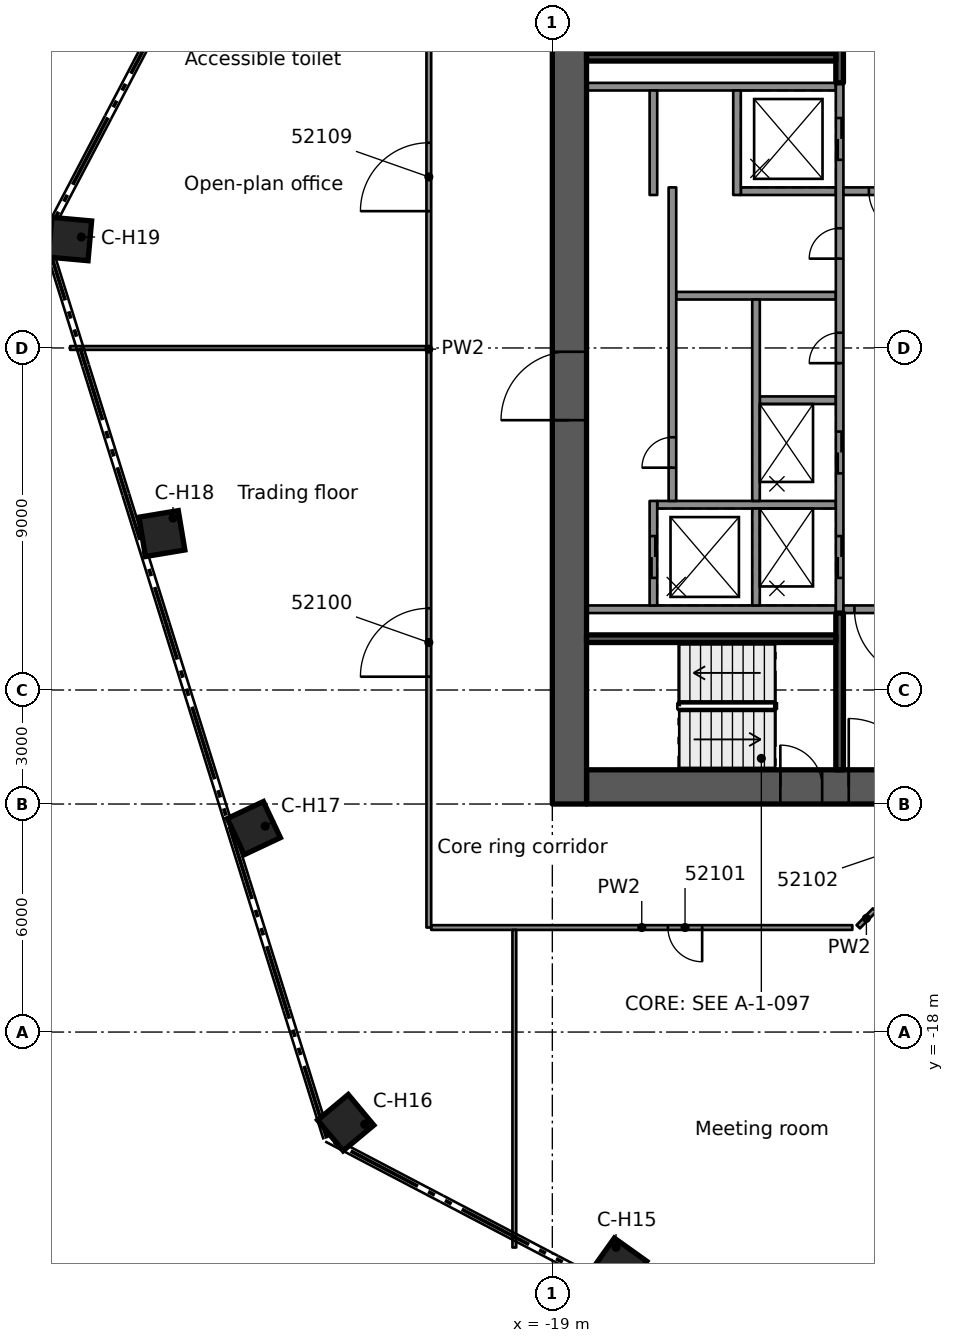
"""IFC4 building model, lengths in metres.
Left out: names, types, materials, properties, quantities, classifications, styles, units other than length and angle.
Written with IfcOpenShell. Run it as: python <this file> out.ifc"""

import sys

from ifc_helpers import new_model, si_unit, direction, frame, frame_2d, origin, origin_2d, place, context, subcontext, project, spatial, rectangle, extrude, element, fill, save


model = new_model("IFC4")
c1 = context("Model", 3, precision=1e-05, world=origin(), true_north=direction((0.0, 1.0)))
c2 = subcontext(c1, "Body", "Model", "MODEL_VIEW")
j1 = project(units=[si_unit("LENGTHUNIT", "METRE"), si_unit("PLANEANGLEUNIT", "RADIAN")], contexts=[c1])
p1 = place(None, origin())
s1 = spatial("IfcSite", under=j1, at=p1, CompositionType="ELEMENT")
p2 = place(p1, origin())
s2 = spatial("IfcBuilding", under=s1, at=p2, CompositionType="ELEMENT")
p3 = place(p2, frame((0.0, 0.0, 257.0)))
s3 = spatial("IfcBuildingStorey", under=s2, at=p3, CompositionType="ELEMENT", Elevation=257.0)
p4 = place(p3, frame((-18.1, -11.55, 0.0), z_axis=(0.0, 0.0, 1.0), x_axis=(1.0, 0.0, 0.0)))
e1 = element("IfcWall", 1, at=p4, inside=s3, PredefinedType="SHEAR", context=c2, shape_type="SweptSolid", body=[
    extrude(rectangle(XDim=9.2, YDim=0.9, at=frame_2d((4.6, 0.0))), origin(), (0.0, 0.0, 1.0), 3.5),
])
p5 = place(p4, frame((6.9, 0.0, 0.0)))
e2 = element("IfcOpeningElement", 2, at=p5, cuts=e1, PredefinedType="OPENING", context=c2, shape_type="SweptSolid", body=[
    extrude(rectangle(XDim=1.8, YDim=2.1, at=frame_2d((0.9, 1.05))), frame((0.0, 0.46, 0.0), z_axis=(0.0, -1.0, 0.0), x_axis=(1.0, 0.0, 0.0)), (0.0, 0.0, 1.0), 0.92),
])
p6 = place(p4, frame((5.1, 0.0, 0.0)))
e3 = element("IfcOpeningElement", 3, at=p6, cuts=e1, PredefinedType="OPENING", context=c2, shape_type="SweptSolid", body=[
    extrude(rectangle(XDim=1.1, YDim=2.1, at=frame_2d((0.55, 1.05))), frame((0.0, 0.46, 0.0), z_axis=(0.0, -1.0, 0.0), x_axis=(1.0, 0.0, 0.0)), (0.0, 0.0, 1.0), 0.92),
])
p7 = place(p3, frame((-18.55, -12.0, 0.0), z_axis=(0.0, 0.0, 1.0), x_axis=(0.0, 1.0, 0.0)))
e4 = element("IfcWall", 4, at=p7, inside=s3, PredefinedType="SHEAR", context=c2, shape_type="SweptSolid", body=[
    extrude(rectangle(XDim=24.0, YDim=0.9, at=frame_2d((12.0, 0.0))), origin(), (0.0, 0.0, 1.0), 3.5),
])
p8 = place(p7, frame((10.1, 0.0, 0.0)))
e5 = element("IfcOpeningElement", 5, at=p8, cuts=e4, PredefinedType="OPENING", context=c2, shape_type="SweptSolid", body=[
    extrude(rectangle(XDim=1.8, YDim=2.1, at=frame_2d((0.9, 1.05))), frame((0.0, 0.46, 0.0), z_axis=(0.0, -1.0, 0.0), x_axis=(1.0, 0.0, 0.0)), (0.0, 0.0, 1.0), 0.92),
])
for number, where, z_axis, x_axis in (
    (6, (-17.246, -24.154, 0.0), (0.0, 0.0, 1.0), (-0.581, -0.814, 0.0)),
    (7, (-24.437, -20.384, 0.0), (0.0, 0.0, 1.0), (-0.768, -0.641, 0.0)),
    (8, (-26.855, -12.634, 0.0), (0.0, 0.0, 1.0), (-0.905, -0.426, 0.0)),
    (9, (-29.274, -4.884, 0.0), (0.0, 0.0, 1.0), (-0.986, -0.165, 0.0)),
    (10, (-31.693, 2.866, 0.0), (0.0, 0.0, 1.0), (-0.996, 0.09, 0.0)),
):
    element("IfcColumn", number, at=place(p3, frame(where, z_axis=z_axis, x_axis=x_axis)), inside=s3, PredefinedType="COLUMN", context=c2, shape_type="SweptSolid", body=[
        extrude(rectangle(XDim=1.05, YDim=1.05, at=origin_2d()), origin(), (0.0, 0.0, 1.0), 3.5),
    ])
for number, where, z_axis, x_axis in (
    (11, (-11.54, 6.875, 0.0), (0.0, 0.0, 1.0), (-1.0, 0.0, 0.0)),
    (12, (-11.54, -6.875, 0.0), (0.0, 0.0, 1.0), (-1.0, 0.0, 0.0)),
):
    element("IfcWall", number, at=place(p3, frame(where, z_axis=z_axis, x_axis=x_axis)), inside=s3, PredefinedType="SOLIDWALL", context=c2, shape_type="SweptSolid", body=[
        extrude(rectangle(XDim=6.56, YDim=0.2, at=frame_2d((3.28, 0.0))), origin(), (0.0, 0.0, 1.0), 3.09),
    ])
p9 = place(p3, frame((-11.54, -4.125, 0.0), z_axis=(0.0, 0.0, 1.0), x_axis=(-1.0, 0.0, 0.0)))
e13 = element("IfcWall", 13, at=p9, inside=s3, PredefinedType="SOLIDWALL", context=c2, shape_type="SweptSolid", body=[
    extrude(rectangle(XDim=4.7, YDim=0.2, at=frame_2d((2.35, 0.0))), origin(), (0.0, 0.0, 1.0), 3.09),
])
p10 = place(p3, frame((-11.54, -1.375, 0.0), z_axis=(0.0, 0.0, 1.0), x_axis=(-1.0, 0.0, 0.0)))
e14 = element("IfcWall", 14, at=p10, inside=s3, PredefinedType="SOLIDWALL", context=c2, shape_type="SweptSolid", body=[
    extrude(rectangle(XDim=2.0, YDim=0.2, at=frame_2d((1.0, 0.0))), origin(), (0.0, 0.0, 1.0), 3.09),
])
p11 = place(p3, frame((-11.54, 1.375, 0.0), z_axis=(0.0, 0.0, 1.0), x_axis=(-1.0, 0.0, 0.0)))
e15 = element("IfcWall", 15, at=p11, inside=s3, PredefinedType="SOLIDWALL", context=c2, shape_type="SweptSolid", body=[
    extrude(rectangle(XDim=4.2, YDim=0.2, at=frame_2d((2.1, 0.0))), origin(), (0.0, 0.0, 1.0), 3.09),
])
p12 = place(p3, frame((-11.54, 4.125, 0.0), z_axis=(0.0, 0.0, 1.0), x_axis=(-1.0, 0.0, 0.0)))
e16 = element("IfcWall", 16, at=p12, inside=s3, PredefinedType="SOLIDWALL", context=c2, shape_type="SweptSolid", body=[
    extrude(rectangle(XDim=2.5, YDim=0.2, at=frame_2d((1.25, 0.0))), origin(), (0.0, 0.0, 1.0), 3.09),
])
p13 = place(p3, frame((-11.44, -6.975, 0.0), z_axis=(0.0, 0.0, 1.0), x_axis=(0.0, 1.0, 0.0)))
e17 = element("IfcWall", 17, at=p13, inside=s3, PredefinedType="SOLIDWALL", context=c2, shape_type="SweptSolid", body=[
    extrude(rectangle(XDim=13.95, YDim=0.2, at=frame_2d((6.975, 0.0))), origin(), (0.0, 0.0, 1.0), 3.09),
])
p14 = place(p13, frame((0.925, 0.0, 0.0)))
e18 = element("IfcOpeningElement", 18, at=p14, cuts=e17, PredefinedType="OPENING", context=c2, shape_type="SweptSolid", body=[
    extrude(rectangle(XDim=1.1, YDim=2.1, at=frame_2d((0.55, 1.05))), frame((0.0, 0.11, 0.0), z_axis=(0.0, -1.0, 0.0), x_axis=(1.0, 0.0, 0.0)), (0.0, 0.0, 1.0), 0.22),
])
p15 = place(p13, frame((3.675, 0.0, 0.0)))
e19 = element("IfcOpeningElement", 19, at=p15, cuts=e17, PredefinedType="OPENING", context=c2, shape_type="SweptSolid", body=[
    extrude(rectangle(XDim=1.1, YDim=2.1, at=frame_2d((0.55, 1.05))), frame((0.0, 0.11, 0.0), z_axis=(0.0, -1.0, 0.0), x_axis=(1.0, 0.0, 0.0)), (0.0, 0.0, 1.0), 0.22),
])
p16 = place(p13, frame((11.925, 0.0, 0.0)))
e20 = element("IfcOpeningElement", 20, at=p16, cuts=e17, PredefinedType="OPENING", context=c2, shape_type="SweptSolid", body=[
    extrude(rectangle(XDim=1.1, YDim=2.1, at=frame_2d((0.55, 1.05))), frame((0.0, 0.11, 0.0), z_axis=(0.0, -1.0, 0.0), x_axis=(1.0, 0.0, 0.0)), (0.0, 0.0, 1.0), 0.22),
])
p17 = place(p13, frame((6.575, 0.0, 0.0)))
e21 = element("IfcOpeningElement", 21, at=p17, cuts=e17, PredefinedType="OPENING", context=c2, shape_type="SweptSolid", body=[
    extrude(rectangle(XDim=0.8, YDim=2.1, at=frame_2d((0.4, 1.05))), frame((0.0, 0.11, 0.0), z_axis=(0.0, -1.0, 0.0), x_axis=(1.0, 0.0, 0.0)), (0.0, 0.0, 1.0), 0.22),
])
p18 = place(p13, frame((9.325, 0.0, 0.0)))
e22 = element("IfcOpeningElement", 22, at=p18, cuts=e17, PredefinedType="OPENING", context=c2, shape_type="SweptSolid", body=[
    extrude(rectangle(XDim=0.8, YDim=2.1, at=frame_2d((0.4, 1.05))), frame((0.0, 0.11, 0.0), z_axis=(0.0, -1.0, 0.0), x_axis=(1.0, 0.0, 0.0)), (0.0, 0.0, 1.0), 0.22),
])
p19 = place(p3, frame((-13.64, -6.775, 0.0), z_axis=(0.0, 0.0, 1.0), x_axis=(0.0, 1.0, 0.0)))
e23 = element("IfcWall", 23, at=p19, inside=s3, PredefinedType="SOLIDWALL", context=c2, shape_type="SweptSolid", body=[
    extrude(rectangle(XDim=2.55, YDim=0.2, at=frame_2d((1.275, 0.0))), origin(), (0.0, 0.0, 1.0), 3.09),
])
p20 = place(p3, frame((-13.64, -4.025, 0.0), z_axis=(0.0, 0.0, 1.0), x_axis=(0.0, 1.0, 0.0)))
e24 = element("IfcWall", 24, at=p20, inside=s3, PredefinedType="SOLIDWALL", context=c2, shape_type="SweptSolid", body=[
    extrude(rectangle(XDim=5.3, YDim=0.2, at=frame_2d((2.65, 0.0))), origin(), (0.0, 0.0, 1.0), 3.09),
])
p21 = place(p3, frame((-14.14, 4.025, 0.0), z_axis=(0.0, 0.0, 1.0), x_axis=(0.0, 1.0, 0.0)))
e25 = element("IfcWall", 25, at=p21, inside=s3, PredefinedType="SOLIDWALL", context=c2, shape_type="SweptSolid", body=[
    extrude(rectangle(XDim=2.75, YDim=0.2, at=frame_2d((1.375, 0.0))), origin(), (0.0, 0.0, 1.0), 3.09),
])
p22 = place(p3, frame((-16.34, -6.775, 0.0), z_axis=(0.0, 0.0, 1.0), x_axis=(0.0, 1.0, 0.0)))
e26 = element("IfcWall", 26, at=p22, inside=s3, PredefinedType="SOLIDWALL", context=c2, shape_type="SweptSolid", body=[
    extrude(rectangle(XDim=2.75, YDim=0.2, at=frame_2d((1.375, 0.0))), origin(), (0.0, 0.0, 1.0), 3.09),
])
p23 = place(p22, frame((0.725, 0.0, 0.0)))
e27 = element("IfcOpeningElement", 27, at=p23, cuts=e26, PredefinedType="OPENING", context=c2, shape_type="SweptSolid", body=[
    extrude(rectangle(XDim=1.1, YDim=2.1, at=frame_2d((0.55, 1.05))), frame((0.0, 0.11, 0.0), z_axis=(0.0, -1.0, 0.0), x_axis=(1.0, 0.0, 0.0)), (0.0, 0.0, 1.0), 0.22),
])
p24 = place(p3, frame((-15.84, -4.025, 0.0), z_axis=(0.0, 0.0, 1.0), x_axis=(0.0, 1.0, 0.0)))
e28 = element("IfcWall", 28, at=p24, inside=s3, PredefinedType="SOLIDWALL", context=c2, shape_type="SweptSolid", body=[
    extrude(rectangle(XDim=8.25, YDim=0.2, at=frame_2d((4.125, 0.0))), origin(), (0.0, 0.0, 1.0), 3.09),
])
p25 = place(p24, frame((0.875, 0.0, 0.0)))
e29 = element("IfcOpeningElement", 29, at=p25, cuts=e28, PredefinedType="OPENING", context=c2, shape_type="SweptSolid", body=[
    extrude(rectangle(XDim=0.8, YDim=2.1, at=frame_2d((0.4, 1.05))), frame((0.0, 0.11, 0.0), z_axis=(0.0, -1.0, 0.0), x_axis=(1.0, 0.0, 0.0)), (0.0, 0.0, 1.0), 0.22),
])
p26 = place(p3, frame((-16.34, 4.025, 0.0), z_axis=(0.0, 0.0, 1.0), x_axis=(0.0, 1.0, 0.0)))
e30 = element("IfcWall", 30, at=p26, inside=s3, PredefinedType="SOLIDWALL", context=c2, shape_type="SweptSolid", body=[
    extrude(rectangle(XDim=2.75, YDim=0.2, at=frame_2d((1.375, 0.0))), origin(), (0.0, 0.0, 1.0), 3.09),
])
p27 = place(p3, frame((-11.44, 6.975, 0.0), z_axis=(0.0, 0.0, 1.0), x_axis=(0.0, 1.0, 0.0)))
e31 = element("IfcWall", 31, at=p27, inside=s3, PredefinedType="SOLIDWALL", context=c2, shape_type="SweptSolid", body=[
    extrude(rectangle(XDim=4.125, YDim=0.2, at=frame_2d((2.062, 0.0))), origin(), (0.0, 0.0, 1.0), 3.09),
])
p28 = place(p27, frame((2.1, 0.0, 0.0)))
e32 = element("IfcOpeningElement", 32, at=p28, cuts=e31, PredefinedType="OPENING", context=c2, shape_type="SweptSolid", body=[
    extrude(rectangle(XDim=1.1, YDim=2.1, at=frame_2d((0.55, 1.05))), frame((0.0, 0.11, 0.0), z_axis=(0.0, -1.0, 0.0), x_axis=(1.0, 0.0, 0.0)), (0.0, 0.0, 1.0), 0.22),
])
p29 = place(p3, frame((-11.54, 7.65, 0.0), z_axis=(0.0, 0.0, 1.0), x_axis=(-1.0, 0.0, 0.0)))
e33 = element("IfcWall", 33, at=p29, inside=s3, PredefinedType="SOLIDWALL", context=c2, shape_type="SweptSolid", body=[
    extrude(rectangle(XDim=6.56, YDim=0.2, at=frame_2d((3.28, 0.0))), origin(), (0.0, 0.0, 1.0), 3.09),
])
p30 = place(p3, frame((-11.44, -11.1, 0.0), z_axis=(0.0, 0.0, 1.0), x_axis=(0.0, 1.0, 0.0)))
e34 = element("IfcWall", 34, at=p30, inside=s3, PredefinedType="SOLIDWALL", context=c2, shape_type="SweptSolid", body=[
    extrude(rectangle(XDim=4.125, YDim=0.2, at=frame_2d((2.062, 0.0))), origin(), (0.0, 0.0, 1.0), 3.09),
])
p31 = place(p3, frame((-11.54, -7.65, 0.0), z_axis=(0.0, 0.0, 1.0), x_axis=(-1.0, 0.0, 0.0)))
e35 = element("IfcWall", 35, at=p31, inside=s3, PredefinedType="SOLIDWALL", context=c2, shape_type="SweptSolid", body=[
    extrude(rectangle(XDim=6.56, YDim=0.2, at=frame_2d((3.28, 0.0))), origin(), (0.0, 0.0, 1.0), 3.09),
])
p32 = place(p3, frame((-8.9, 4.125, 0.0), z_axis=(0.0, 0.0, 1.0), x_axis=(-1.0, 0.0, 0.0)))
e36 = element("IfcWall", 36, at=p32, inside=s3, PredefinedType="PARTITIONING", context=c2, shape_type="SweptSolid", body=[
    extrude(rectangle(XDim=2.44, YDim=0.2, at=frame_2d((1.22, 0.0))), origin(), (0.0, 0.0, 1.0), 3.09),
])
p33 = place(p32, frame((0.67, 0.0, 0.0)))
e37 = element("IfcOpeningElement", 37, at=p33, cuts=e36, PredefinedType="OPENING", context=c2, shape_type="SweptSolid", body=[
    extrude(rectangle(XDim=1.1, YDim=2.1, at=frame_2d((0.55, 1.05))), frame((0.0, 0.11, 0.0), z_axis=(0.0, -1.0, 0.0), x_axis=(1.0, 0.0, 0.0)), (0.0, 0.0, 1.0), 0.22),
])
p34 = place(p3, frame((-8.9, -6.875, 0.0), z_axis=(0.0, 0.0, 1.0), x_axis=(-1.0, 0.0, 0.0)))
e38 = element("IfcWall", 38, at=p34, inside=s3, PredefinedType="PARTITIONING", context=c2, shape_type="SweptSolid", body=[
    extrude(rectangle(XDim=2.44, YDim=0.2, at=frame_2d((1.22, 0.0))), origin(), (0.0, 0.0, 1.0), 3.09),
])
p35 = place(p34, frame((0.35, 0.0, 0.0)))
e39 = element("IfcOpeningElement", 39, at=p35, cuts=e38, PredefinedType="OPENING", context=c2, shape_type="SweptSolid", body=[
    extrude(rectangle(XDim=1.8, YDim=2.1, at=frame_2d((0.9, 1.05))), frame((0.0, 0.11, 0.0), z_axis=(0.0, -1.0, 0.0), x_axis=(1.0, 0.0, 0.0)), (0.0, 0.0, 1.0), 0.22),
])
p36 = place(p3, frame((-11.106, -15.25, 0.0), z_axis=(0.0, 0.0, 1.0), x_axis=(-1.0, 0.0, 0.0)))
e40 = element("IfcWall", 40, at=p36, inside=s3, PredefinedType="PARTITIONING", context=c2, shape_type="SweptSolid", body=[
    extrude(rectangle(XDim=11.082, YDim=0.125, at=frame_2d((5.541, 0.0))), origin(), (0.0, 0.0, 1.0), 3.08),
])
p37 = place(p36, frame((3.952, 0.0, 0.0)))
e41 = element("IfcOpeningElement", 41, at=p37, cuts=e40, PredefinedType="OPENING", context=c2, shape_type="SweptSolid", body=[
    extrude(rectangle(XDim=0.9, YDim=2.1, at=frame_2d((0.45, 1.05))), frame((0.0, 0.073, 0.0), z_axis=(0.0, -1.0, 0.0), x_axis=(1.0, 0.0, 0.0)), (0.0, 0.0, 1.0), 0.145),
])
p38 = place(p3, frame((-31.69, 0.0, 0.0), z_axis=(0.0, 0.0, 1.0), x_axis=(1.0, 0.0, 0.0)))
e42 = element("IfcWall", 42, at=p38, inside=s3, PredefinedType="PARTITIONING", context=c2, shape_type="SweptSolid", body=[
    extrude(rectangle(XDim=9.378, YDim=0.1, at=frame_2d((4.689, 0.0))), origin(), (0.0, 0.0, 1.0), 3.08),
])
p39 = place(p3, frame((-10.95, -15.229, 0.0), z_axis=(0.0, 0.0, 1.0), x_axis=(0.698110320765, 0.715990209459, 0.0)))
e43 = element("IfcWall", 43, at=p39, inside=s3, PredefinedType="PARTITIONING", context=c2, shape_type="SweptSolid", body=[
    extrude(rectangle(XDim=0.615, YDim=0.125, at=frame_2d((0.307, 0.0))), origin(), (0.0, 0.0, 1.0), 3.08),
])
p40 = place(p3, frame((-20.0, -23.669, 0.0), z_axis=(0.0, 0.0, 1.0), x_axis=(0.0, 1.0, 0.0)))
e44 = element("IfcWall", 44, at=p40, inside=s3, PredefinedType="PARTITIONING", context=c2, shape_type="SweptSolid", body=[
    extrude(rectangle(XDim=8.357, YDim=0.1, at=frame_2d((4.178, 0.0))), origin(), (0.0, 0.0, 1.0), 3.08),
])
p41 = place(p3, frame((-22.25, -15.25, 0.0), z_axis=(0.0, 0.0, 1.0), x_axis=(0.0, 1.0, 0.0)))
e45 = element("IfcWall", 45, at=p41, inside=s3, PredefinedType="PARTITIONING", context=c2, shape_type="SweptSolid", body=[
    extrude(rectangle(XDim=30.437, YDim=0.125, at=frame_2d((15.219, 0.0))), origin(), (0.0, 0.0, 1.0), 3.08),
])
p42 = place(p41, frame((6.6, 0.0, 0.0)))
e46 = element("IfcOpeningElement", 46, at=p42, cuts=e45, PredefinedType="OPENING", context=c2, shape_type="SweptSolid", body=[
    extrude(rectangle(XDim=1.8, YDim=2.1, at=frame_2d((0.9, 1.05))), frame((0.0, 0.073, 0.0), z_axis=(0.0, -1.0, 0.0), x_axis=(1.0, 0.0, 0.0)), (0.0, 0.0, 1.0), 0.145),
])
p43 = place(p41, frame((18.85, 0.0, 0.0)))
e47 = element("IfcOpeningElement", 47, at=p43, cuts=e45, PredefinedType="OPENING", context=c2, shape_type="SweptSolid", body=[
    extrude(rectangle(XDim=1.8, YDim=2.1, at=frame_2d((0.9, 1.05))), frame((0.0, 0.073, 0.0), z_axis=(0.0, -1.0, 0.0), x_axis=(1.0, 0.0, 0.0)), (0.0, 0.0, 1.0), 0.145),
])
p44 = place(p41, frame((26.849, 0.0, 0.0)))
e48 = element("IfcOpeningElement", 48, at=p44, cuts=e45, PredefinedType="OPENING", context=c2, shape_type="SweptSolid", body=[
    extrude(rectangle(XDim=1.1, YDim=2.1, at=frame_2d((0.55, 1.05))), frame((0.0, 0.073, 0.0), z_axis=(0.0, -1.0, 0.0), x_axis=(1.0, 0.0, 0.0)), (0.0, 0.0, 1.0), 0.145),
])
p45 = place(p14, origin())
e49 = element("IfcDoor", 49, at=p45, inside=s3, OperationType="DOUBLE_DOOR_SLIDING", PredefinedType="DOOR", context=c2, shape_type="SweptSolid", body=[
    extrude(rectangle(XDim=1.1, YDim=2.1, at=frame_2d((0.55, 1.05))), frame((0.0, 0.025, 0.0), z_axis=(0.0, -1.0, 0.0), x_axis=(1.0, 0.0, 0.0)), (0.0, 0.0, 1.0), 0.05),
])
fill(e18, e49)
p46 = place(p23, origin())
e50 = element("IfcDoor", 50, at=p46, inside=s3, OperationType="DOUBLE_DOOR_SLIDING", PredefinedType="DOOR", context=c2, shape_type="SweptSolid", body=[
    extrude(rectangle(XDim=1.1, YDim=2.1, at=frame_2d((0.55, 1.05))), frame((0.0, 0.025, 0.0), z_axis=(0.0, -1.0, 0.0), x_axis=(1.0, 0.0, 0.0)), (0.0, 0.0, 1.0), 0.05),
])
fill(e27, e50)
p47 = place(p15, origin())
e51 = element("IfcDoor", 51, at=p47, inside=s3, OperationType="DOUBLE_DOOR_SLIDING", PredefinedType="DOOR", context=c2, shape_type="SweptSolid", body=[
    extrude(rectangle(XDim=1.1, YDim=2.1, at=frame_2d((0.55, 1.05))), frame((0.0, 0.025, 0.0), z_axis=(0.0, -1.0, 0.0), x_axis=(1.0, 0.0, 0.0)), (0.0, 0.0, 1.0), 0.05),
])
fill(e19, e51)
p48 = place(p16, origin())
e52 = element("IfcDoor", 52, at=p48, inside=s3, OperationType="DOUBLE_DOOR_SLIDING", PredefinedType="DOOR", context=c2, shape_type="SweptSolid", body=[
    extrude(rectangle(XDim=1.1, YDim=2.1, at=frame_2d((0.55, 1.05))), frame((0.0, 0.025, 0.0), z_axis=(0.0, -1.0, 0.0), x_axis=(1.0, 0.0, 0.0)), (0.0, 0.0, 1.0), 0.05),
])
fill(e20, e52)
p49 = place(p25, origin())
e53 = element("IfcDoor", 53, at=p49, inside=s3, OperationType="SINGLE_SWING_LEFT", PredefinedType="DOOR", context=c2, shape_type="SweptSolid", body=[
    extrude(rectangle(XDim=0.8, YDim=2.1, at=frame_2d((0.4, 1.05))), frame((0.0, 0.025, 0.0), z_axis=(0.0, -1.0, 0.0), x_axis=(1.0, 0.0, 0.0)), (0.0, 0.0, 1.0), 0.05),
])
fill(e29, e53)
p50 = place(p17, origin())
e54 = element("IfcDoor", 54, at=p50, inside=s3, OperationType="SINGLE_SWING_LEFT", PredefinedType="DOOR", context=c2, shape_type="SweptSolid", body=[
    extrude(rectangle(XDim=0.8, YDim=2.1, at=frame_2d((0.4, 1.05))), frame((0.0, 0.025, 0.0), z_axis=(0.0, -1.0, 0.0), x_axis=(1.0, 0.0, 0.0)), (0.0, 0.0, 1.0), 0.05),
])
fill(e21, e54)
p51 = place(p18, origin())
e55 = element("IfcDoor", 55, at=p51, inside=s3, OperationType="SINGLE_SWING_LEFT", PredefinedType="DOOR", context=c2, shape_type="SweptSolid", body=[
    extrude(rectangle(XDim=0.8, YDim=2.1, at=frame_2d((0.4, 1.05))), frame((0.0, 0.025, 0.0), z_axis=(0.0, -1.0, 0.0), x_axis=(1.0, 0.0, 0.0)), (0.0, 0.0, 1.0), 0.05),
])
fill(e22, e55)
p52 = place(p8, origin())
e56 = element("IfcDoor", 56, at=p52, inside=s3, OperationType="SINGLE_SWING_LEFT", PredefinedType="DOOR", context=c2, shape_type="SweptSolid", body=[
    extrude(rectangle(XDim=1.8, YDim=2.1, at=frame_2d((0.9, 1.05))), frame((0.0, 0.025, 0.0), z_axis=(0.0, -1.0, 0.0), x_axis=(1.0, 0.0, 0.0)), (0.0, 0.0, 1.0), 0.05),
])
fill(e5, e56)
p53 = place(p33, origin())
e57 = element("IfcDoor", 57, at=p53, inside=s3, OperationType="SINGLE_SWING_RIGHT", PredefinedType="DOOR", context=c2, shape_type="SweptSolid", body=[
    extrude(rectangle(XDim=1.1, YDim=2.1, at=frame_2d((0.55, 1.05))), frame((0.0, 0.025, 0.0), z_axis=(0.0, -1.0, 0.0), x_axis=(1.0, 0.0, 0.0)), (0.0, 0.0, 1.0), 0.05),
])
fill(e37, e57)
p54 = place(p35, origin())
e58 = element("IfcDoor", 58, at=p54, inside=s3, OperationType="DOUBLE_DOOR_DOUBLE_SWING", PredefinedType="DOOR", context=c2, shape_type="SweptSolid", body=[
    extrude(rectangle(XDim=1.8, YDim=2.1, at=frame_2d((0.9, 1.05))), frame((0.0, 0.025, 0.0), z_axis=(0.0, -1.0, 0.0), x_axis=(1.0, 0.0, 0.0)), (0.0, 0.0, 1.0), 0.05),
])
fill(e39, e58)
p55 = place(p5, origin())
e59 = element("IfcDoor", 59, at=p55, inside=s3, OperationType="SINGLE_SWING_RIGHT", PredefinedType="DOOR", context=c2, shape_type="SweptSolid", body=[
    extrude(rectangle(XDim=1.8, YDim=2.1, at=frame_2d((0.9, 1.05))), frame((0.0, 0.025, 0.0), z_axis=(0.0, -1.0, 0.0), x_axis=(1.0, 0.0, 0.0)), (0.0, 0.0, 1.0), 0.05),
])
fill(e2, e59)
p56 = place(p6, origin())
e60 = element("IfcDoor", 60, at=p56, inside=s3, OperationType="SINGLE_SWING_RIGHT", PredefinedType="DOOR", context=c2, shape_type="SweptSolid", body=[
    extrude(rectangle(XDim=1.1, YDim=2.1, at=frame_2d((0.55, 1.05))), frame((0.0, 0.025, 0.0), z_axis=(0.0, -1.0, 0.0), x_axis=(1.0, 0.0, 0.0)), (0.0, 0.0, 1.0), 0.05),
])
fill(e3, e60)
p57 = place(p42, origin())
e61 = element("IfcDoor", 61, at=p57, inside=s3, OperationType="DOUBLE_DOOR_SINGLE_SWING", PredefinedType="DOOR", context=c2, shape_type="SweptSolid", body=[
    extrude(rectangle(XDim=1.8, YDim=2.1, at=frame_2d((0.9, 1.05))), frame((0.0, 0.025, 0.0), z_axis=(0.0, -1.0, 0.0), x_axis=(1.0, 0.0, 0.0)), (0.0, 0.0, 1.0), 0.05),
])
fill(e46, e61)
p58 = place(p37, origin())
e62 = element("IfcDoor", 62, at=p58, inside=s3, OperationType="SINGLE_SWING_LEFT", PredefinedType="DOOR", context=c2, shape_type="SweptSolid", body=[
    extrude(rectangle(XDim=0.9, YDim=2.1, at=frame_2d((0.45, 1.05))), frame((0.0, 0.025, 0.0), z_axis=(0.0, -1.0, 0.0), x_axis=(1.0, 0.0, 0.0)), (0.0, 0.0, 1.0), 0.05),
])
fill(e41, e62)
p59 = place(p43, origin())
e63 = element("IfcDoor", 63, at=p59, inside=s3, OperationType="DOUBLE_DOOR_SINGLE_SWING", PredefinedType="DOOR", context=c2, shape_type="SweptSolid", body=[
    extrude(rectangle(XDim=1.8, YDim=2.1, at=frame_2d((0.9, 1.05))), frame((0.0, 0.025, 0.0), z_axis=(0.0, -1.0, 0.0), x_axis=(1.0, 0.0, 0.0)), (0.0, 0.0, 1.0), 0.05),
])
fill(e47, e63)
save(model, sys.argv[1])
